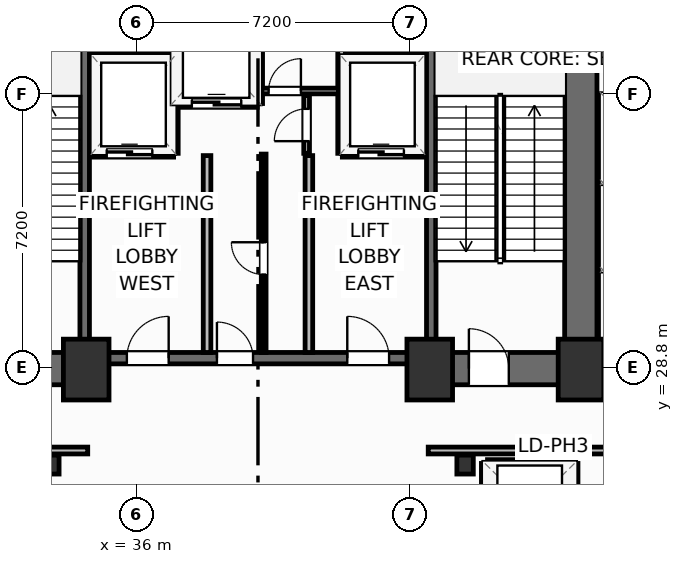
"""IFC4 building model, lengths in metres.
Left out: names, types, materials, properties, quantities, classifications, styles, units other than length and angle.
Written with IfcOpenShell. Run it as: python <this file> out.ifc"""

import sys

from ifc_helpers import new_model, si_unit, direction, frame, frame_2d, origin, origin_2d, place, context, subcontext, project, spatial, rectangle, i_section, extrude, element, fill, save


model = new_model("IFC4")
c1 = context("Model", 3, precision=1e-05, world=origin(), true_north=direction((0.0, 1.0)))
c2 = subcontext(c1, "Body", "Model", "MODEL_VIEW")
j1 = project(units=[si_unit("LENGTHUNIT", "METRE"), si_unit("PLANEANGLEUNIT", "RADIAN")], contexts=[c1])
p1 = place(None, origin())
s1 = spatial("IfcSite", under=j1, at=p1, CompositionType="ELEMENT")
p2 = place(p1, origin())
s2 = spatial("IfcBuilding", under=s1, at=p2, CompositionType="ELEMENT")
p3 = place(p2, origin())
s3 = spatial("IfcBuildingStorey", under=s2, at=p3, CompositionType="ELEMENT", Elevation=0.0)
for number, where, z_axis, x_axis in (
    (1, (34.68, 28.75, 0.0), (0.0, 0.0, 1.0), (1.0, 0.0, 0.0)),
    (2, (43.72, 28.75, 0.0), (0.0, 0.0, 1.0), (1.0, 0.0, 0.0)),
    (3, (47.7, 28.75, 0.0), (0.0, 0.0, 1.0), (1.0, 0.0, 0.0)),
):
    element("IfcColumn", number, at=place(p3, frame(where, z_axis=z_axis, x_axis=x_axis)), inside=s3, PredefinedType="COLUMN", context=c2, shape_type="SweptSolid", body=[
        extrude(rectangle(XDim=1.2, YDim=1.6, at=origin_2d()), origin(), (0.0, 0.0, 1.0), 5.4),
    ])
for number, where, z_axis, x_axis in (
    (4, (33.75, 26.25, 0.0), (0.0, 0.0, 1.0), (1.0, 0.0, 0.0)),
    (5, (44.65, 26.25, 0.0), (0.0, 0.0, 1.0), (1.0, 0.0, 0.0)),
):
    element("IfcColumn", number, at=place(p3, frame(where, z_axis=z_axis, x_axis=x_axis)), inside=s3, PredefinedType="COLUMN", context=c2, shape_type="SweptSolid", body=[
        extrude(i_section(OverallWidth=0.432, OverallDepth=0.498, WebThickness=0.056, FlangeThickness=0.089, FilletRadius=0.025, at=origin_2d()), origin(), (0.0, 0.0, 1.0), 5.4),
    ])
p4 = place(p3, frame((47.695, 29.2, 0.0), z_axis=(0.0, 0.0, 1.0), x_axis=(0.0, 1.0, 0.0)))
e6 = element("IfcWall", 6, at=p4, inside=s3, PredefinedType="SHEAR", context=c2, shape_type="SweptSolid", body=[
    extrude(rectangle(XDim=9.22, YDim=0.85, at=frame_2d((4.61, 0.0))), origin(), (0.0, 0.0, 1.0), 5.12),
])
p5 = place(p3, frame((30.28, 28.775, 0.0), z_axis=(0.0, 0.0, 1.0), x_axis=(1.0, 0.0, 0.0)))
e7 = element("IfcWall", 7, at=p5, inside=s3, PredefinedType="SHEAR", context=c2, shape_type="SweptSolid", body=[
    extrude(rectangle(XDim=4.52, YDim=0.85, at=frame_2d((2.26, 0.0))), origin(), (0.0, 0.0, 1.0), 5.12),
])
p6 = place(p5, frame((1.65, 0.0, 0.0)))
e8 = element("IfcOpeningElement", 8, at=p6, cuts=e7, PredefinedType="OPENING", context=c2, shape_type="SweptSolid", body=[
    extrude(rectangle(XDim=1.05, YDim=2.15, at=frame_2d((0.525, 1.075))), frame((0.0, 0.435, 0.0), z_axis=(0.0, -1.0, 0.0), x_axis=(1.0, 0.0, 0.0)), (0.0, 0.0, 1.0), 0.87),
])
p7 = place(p3, frame((43.6, 28.775, 0.0), z_axis=(0.0, 0.0, 1.0), x_axis=(1.0, 0.0, 0.0)))
e9 = element("IfcWall", 9, at=p7, inside=s3, PredefinedType="SHEAR", context=c2, shape_type="SweptSolid", body=[
    extrude(rectangle(XDim=4.52, YDim=0.85, at=frame_2d((2.26, 0.0))), origin(), (0.0, 0.0, 1.0), 5.12),
])
p8 = place(p7, frame((1.15, 0.0, 0.0)))
e10 = element("IfcOpeningElement", 10, at=p8, cuts=e9, PredefinedType="OPENING", context=c2, shape_type="SweptSolid", body=[
    extrude(rectangle(XDim=1.05, YDim=2.15, at=frame_2d((0.525, 1.075))), frame((0.0, 0.435, 0.0), z_axis=(0.0, -1.0, 0.0), x_axis=(1.0, 0.0, 0.0)), (0.0, 0.0, 1.0), 0.87),
])
p9 = place(p3, frame((34.8, 29.05, 0.0), z_axis=(0.0, 0.0, 1.0), x_axis=(1.0, 0.0, 0.0)))
e11 = element("IfcWall", 11, at=p9, inside=s3, PredefinedType="SHEAR", context=c2, shape_type="SweptSolid", body=[
    extrude(rectangle(XDim=8.8, YDim=0.3, at=frame_2d((4.4, 0.0))), origin(), (0.0, 0.0, 1.0), 5.12),
])
p10 = place(p9, frame((0.95, 0.0, 0.0)))
e12 = element("IfcOpeningElement", 12, at=p10, cuts=e11, PredefinedType="OPENING", context=c2, shape_type="SweptSolid", body=[
    extrude(rectangle(XDim=1.1, YDim=2.15, at=frame_2d((0.55, 1.075))), frame((0.0, 0.16, 0.0), z_axis=(0.0, -1.0, 0.0), x_axis=(1.0, 0.0, 0.0)), (0.0, 0.0, 1.0), 0.32),
])
p11 = place(p9, frame((6.75, 0.0, 0.0)))
e13 = element("IfcOpeningElement", 13, at=p11, cuts=e11, PredefinedType="OPENING", context=c2, shape_type="SweptSolid", body=[
    extrude(rectangle(XDim=1.1, YDim=2.15, at=frame_2d((0.55, 1.075))), frame((0.0, 0.16, 0.0), z_axis=(0.0, -1.0, 0.0), x_axis=(1.0, 0.0, 0.0)), (0.0, 0.0, 1.0), 0.32),
])
p12 = place(p9, frame((3.32, 0.0, 0.0)))
e14 = element("IfcOpeningElement", 14, at=p12, cuts=e11, PredefinedType="OPENING", context=c2, shape_type="SweptSolid", body=[
    extrude(rectangle(XDim=0.95, YDim=2.15, at=frame_2d((0.475, 1.075))), frame((0.0, 0.16, 0.0), z_axis=(0.0, -1.0, 0.0), x_axis=(1.0, 0.0, 0.0)), (0.0, 0.0, 1.0), 0.32),
])
for number, where, z_axis, x_axis in (
    (15, (34.64, 29.2, 0.0), (0.0, 0.0, 1.0), (0.0, 1.0, 0.0)),
    (16, (43.76, 29.2, 0.0), (0.0, 0.0, 1.0), (0.0, 1.0, 0.0)),
):
    element("IfcWall", number, at=place(p3, frame(where, z_axis=z_axis, x_axis=x_axis)), inside=s3, PredefinedType="SHEAR", context=c2, shape_type="SweptSolid", body=[
        extrude(rectangle(XDim=9.22, YDim=0.25, at=frame_2d((4.61, 0.0))), origin(), (0.0, 0.0, 1.0), 5.12),
    ])
p13 = place(p3, frame((21.22, 26.62, 0.0), z_axis=(0.0, 0.0, 1.0), x_axis=(1.0, 0.0, 0.0)))
e17 = element("IfcWall", 17, at=p13, inside=s3, PredefinedType="PARTITIONING", context=c2, shape_type="SweptSolid", body=[
    extrude(rectangle(XDim=13.5, YDim=0.18, at=frame_2d((6.75, 0.0))), origin(), (0.0, 0.0, 1.0), 4.332),
])
p14 = place(p13, frame((5.2, 0.0, 0.0)))
e18 = element("IfcOpeningElement", 18, at=p14, cuts=e17, PredefinedType="OPENING", context=c2, shape_type="SweptSolid", body=[
    extrude(rectangle(XDim=1.1, YDim=2.15, at=frame_2d((0.55, 1.075))), frame((0.0, 0.1, 0.0), z_axis=(0.0, -1.0, 0.0), x_axis=(1.0, 0.0, 0.0)), (0.0, 0.0, 1.0), 0.2),
])
p15 = place(p3, frame((43.68, 26.62, 0.0), z_axis=(0.0, 0.0, 1.0), x_axis=(1.0, 0.0, 0.0)))
e19 = element("IfcWall", 19, at=p15, inside=s3, PredefinedType="PARTITIONING", context=c2, shape_type="SweptSolid", body=[
    extrude(rectangle(XDim=10.98, YDim=0.18, at=frame_2d((5.49, 0.0))), origin(), (0.0, 0.0, 1.0), 5.12),
])
p16 = place(p15, frame((5.03, 0.0, 0.0)))
e20 = element("IfcOpeningElement", 20, at=p16, cuts=e19, PredefinedType="OPENING", context=c2, shape_type="SweptSolid", body=[
    extrude(rectangle(XDim=1.1, YDim=2.15, at=frame_2d((0.55, 1.075))), frame((0.0, 0.1, 0.0), z_axis=(0.0, -1.0, 0.0), x_axis=(1.0, 0.0, 0.0)), (0.0, 0.0, 1.0), 0.2),
])
p17 = place(p3, frame((48.12, 28.8, 0.0), z_axis=(0.0, 0.0, 1.0), x_axis=(1.0, 0.0, 0.0)))
e21 = element("IfcWall", 21, at=p17, inside=s3, PredefinedType="PARTITIONING", context=c2, shape_type="SweptSolid", body=[
    extrude(rectangle(XDim=4.02, YDim=0.18, at=frame_2d((2.01, 0.0))), origin(), (0.0, 0.0, 1.0), 4.332),
])
for number, where, z_axis, x_axis in (
    (22, (37.86, 29.2, 0.0), (0.0, 0.0, 1.0), (0.0, 1.0, 0.0)),
    (23, (40.54, 29.2, 0.0), (0.0, 0.0, 1.0), (0.0, 1.0, 0.0)),
):
    element("IfcWall", number, at=place(p3, frame(where, z_axis=z_axis, x_axis=x_axis)), inside=s3, PredefinedType="PARTITIONING", context=c2, shape_type="SweptSolid", body=[
        extrude(rectangle(XDim=5.18, YDim=0.2, at=frame_2d((2.59, 0.0))), origin(), (0.0, 0.0, 1.0), 5.12),
    ])
p18 = place(p3, frame((34.8, 34.44, 0.0), z_axis=(0.0, 0.0, 1.0), x_axis=(1.0, 0.0, 0.0)))
e24 = element("IfcWall", 24, at=p18, inside=s3, PredefinedType="PARTITIONING", context=c2, shape_type="SweptSolid", body=[
    extrude(rectangle(XDim=2.18, YDim=0.2, at=frame_2d((1.09, 0.0))), origin(), (0.0, 0.0, 1.0), 5.12),
])
p19 = place(p18, frame((0.42, 0.0, 0.0)))
e25 = element("IfcOpeningElement", 25, at=p19, cuts=e24, PredefinedType="OPENING", context=c2, shape_type="SweptSolid", body=[
    extrude(rectangle(XDim=1.2, YDim=2.2, at=frame_2d((0.6, 1.1))), frame((0.0, 0.11, 0.0), z_axis=(0.0, -1.0, 0.0), x_axis=(1.0, 0.0, 0.0)), (0.0, 0.0, 1.0), 0.22),
])
p20 = place(p3, frame((34.8, 36.98, 0.0), z_axis=(0.0, 0.0, 1.0), x_axis=(1.0, 0.0, 0.0)))
e26 = element("IfcWall", 26, at=p20, inside=s3, PredefinedType="PARTITIONING", context=c2, shape_type="SweptSolid", body=[
    extrude(rectangle(XDim=2.18, YDim=0.2, at=frame_2d((1.09, 0.0))), origin(), (0.0, 0.0, 1.0), 5.12),
])
p21 = place(p3, frame((37.0, 34.44, 0.0), z_axis=(0.0, 0.0, 1.0), x_axis=(0.0, 1.0, 0.0)))
e27 = element("IfcWall", 27, at=p21, inside=s3, PredefinedType="PARTITIONING", context=c2, shape_type="SweptSolid", body=[
    extrude(rectangle(XDim=3.9, YDim=0.2, at=frame_2d((1.95, 0.0))), origin(), (0.0, 0.0, 1.0), 5.12),
])
p22 = place(p3, frame((41.42, 34.44, 0.0), z_axis=(0.0, 0.0, 1.0), x_axis=(1.0, 0.0, 0.0)))
e28 = element("IfcWall", 28, at=p22, inside=s3, PredefinedType="PARTITIONING", context=c2, shape_type="SweptSolid", body=[
    extrude(rectangle(XDim=2.18, YDim=0.2, at=frame_2d((1.09, 0.0))), origin(), (0.0, 0.0, 1.0), 5.12),
])
p23 = place(p22, frame((0.42, 0.0, 0.0)))
e29 = element("IfcOpeningElement", 29, at=p23, cuts=e28, PredefinedType="OPENING", context=c2, shape_type="SweptSolid", body=[
    extrude(rectangle(XDim=1.2, YDim=2.2, at=frame_2d((0.6, 1.1))), frame((0.0, 0.11, 0.0), z_axis=(0.0, -1.0, 0.0), x_axis=(1.0, 0.0, 0.0)), (0.0, 0.0, 1.0), 0.22),
])
p24 = place(p3, frame((41.42, 36.98, 0.0), z_axis=(0.0, 0.0, 1.0), x_axis=(1.0, 0.0, 0.0)))
e30 = element("IfcWall", 30, at=p24, inside=s3, PredefinedType="PARTITIONING", context=c2, shape_type="SweptSolid", body=[
    extrude(rectangle(XDim=2.18, YDim=0.2, at=frame_2d((1.09, 0.0))), origin(), (0.0, 0.0, 1.0), 5.12),
])
p25 = place(p3, frame((41.4, 34.44, 0.0), z_axis=(0.0, 0.0, 1.0), x_axis=(0.0, 1.0, 0.0)))
e31 = element("IfcWall", 31, at=p25, inside=s3, PredefinedType="PARTITIONING", context=c2, shape_type="SweptSolid", body=[
    extrude(rectangle(XDim=3.9, YDim=0.2, at=frame_2d((1.95, 0.0))), origin(), (0.0, 0.0, 1.0), 5.12),
])
p26 = place(p3, frame((37.06, 35.75, 0.0), z_axis=(0.0, 0.0, 1.0), x_axis=(1.0, 0.0, 0.0)))
e32 = element("IfcWall", 32, at=p26, inside=s3, PredefinedType="PARTITIONING", context=c2, shape_type="SweptSolid", body=[
    extrude(rectangle(XDim=2.12, YDim=0.2, at=frame_2d((1.06, 0.0))), origin(), (0.0, 0.0, 1.0), 5.12),
])
p27 = place(p26, frame((0.4, 0.0, 0.0)))
e33 = element("IfcOpeningElement", 33, at=p27, cuts=e32, PredefinedType="OPENING", context=c2, shape_type="SweptSolid", body=[
    extrude(rectangle(XDim=1.3, YDim=2.2, at=frame_2d((0.65, 1.1))), frame((0.0, 0.11, 0.0), z_axis=(0.0, -1.0, 0.0), x_axis=(1.0, 0.0, 0.0)), (0.0, 0.0, 1.0), 0.22),
])
p28 = place(p3, frame((39.22, 35.75, 0.0), z_axis=(0.0, 0.0, 1.0), x_axis=(0.0, 1.0, 0.0)))
e34 = element("IfcWall", 34, at=p28, inside=s3, PredefinedType="PARTITIONING", context=c2, shape_type="SweptSolid", body=[
    extrude(rectangle(XDim=2.59, YDim=0.2, at=frame_2d((1.295, 0.0))), origin(), (0.0, 0.0, 1.0), 5.12),
])
p29 = place(p3, frame((39.3, 36.08, 0.0), z_axis=(0.0, 0.0, 1.0), x_axis=(1.0, 0.0, 0.0)))
e35 = element("IfcWall", 35, at=p29, inside=s3, PredefinedType="PARTITIONING", context=c2, shape_type="SweptSolid", body=[
    extrude(rectangle(XDim=2.02, YDim=0.15, at=frame_2d((1.01, 0.0))), origin(), (0.0, 0.0, 1.0), 5.12),
])
p30 = place(p29, frame((0.18, 0.0, 0.0)))
e36 = element("IfcOpeningElement", 36, at=p30, cuts=e35, PredefinedType="OPENING", context=c2, shape_type="SweptSolid", body=[
    extrude(rectangle(XDim=0.85, YDim=2.05, at=frame_2d((0.425, 1.025))), frame((0.0, 0.085, 0.0), z_axis=(0.0, -1.0, 0.0), x_axis=(1.0, 0.0, 0.0)), (0.0, 0.0, 1.0), 0.17),
])
p31 = place(p3, frame((40.48, 34.44, 0.0), z_axis=(0.0, 0.0, 1.0), x_axis=(0.0, 1.0, 0.0)))
e37 = element("IfcWall", 37, at=p31, inside=s3, PredefinedType="PARTITIONING", context=c2, shape_type="SweptSolid", body=[
    extrude(rectangle(XDim=1.52, YDim=0.15, at=frame_2d((0.76, 0.0))), origin(), (0.0, 0.0, 1.0), 5.12),
])
p32 = place(p31, frame((0.32, 0.0, 0.0)))
e38 = element("IfcOpeningElement", 38, at=p32, cuts=e37, PredefinedType="OPENING", context=c2, shape_type="SweptSolid", body=[
    extrude(rectangle(XDim=0.85, YDim=2.05, at=frame_2d((0.425, 1.025))), frame((0.0, 0.085, 0.0), z_axis=(0.0, -1.0, 0.0), x_axis=(1.0, 0.0, 0.0)), (0.0, 0.0, 1.0), 0.17),
])
p33 = place(p3, frame((39.35, 29.2, 0.0), z_axis=(0.0, 0.0, 1.0), x_axis=(0.0, 1.0, 0.0)))
e39 = element("IfcWall", 39, at=p33, inside=s3, PredefinedType="PARTITIONING", context=c2, shape_type="SweptSolid", body=[
    extrude(rectangle(XDim=5.22, YDim=0.125, at=frame_2d((2.61, 0.0))), origin(), (0.0, 0.0, 1.0), 5.12),
])
p34 = place(p33, frame((2.05, 0.0, 0.0)))
e40 = element("IfcOpeningElement", 40, at=p34, cuts=e39, PredefinedType="OPENING", context=c2, shape_type="SweptSolid", body=[
    extrude(rectangle(XDim=0.85, YDim=2.05, at=frame_2d((0.425, 1.025))), frame((0.0, 0.073, 0.0), z_axis=(0.0, -1.0, 0.0), x_axis=(1.0, 0.0, 0.0)), (0.0, 0.0, 1.0), 0.145),
])
p35 = place(p3, frame((48.28, 29.08, 0.0), z_axis=(0.0, 0.0, 1.0), x_axis=(0.0, 1.0, 0.0)))
e41 = element("IfcWall", 41, at=p35, inside=s3, PredefinedType="PARTITIONING", context=c2, shape_type="SweptSolid", body=[
    extrude(rectangle(XDim=6.89, YDim=0.2, at=frame_2d((3.445, 0.0))), origin(), (0.0, 0.0, 1.0), 5.12),
])
p36 = place(p3, frame((45.24, 26.28, 0.0), z_axis=(0.0, 0.0, 1.0), x_axis=(1.0, 0.0, 0.0)))
e42 = element("IfcWall", 42, at=p36, inside=s3, PredefinedType="PARTITIONING", context=c2, shape_type="SweptSolid", body=[
    extrude(rectangle(XDim=2.22, YDim=0.2, at=frame_2d((1.11, 0.0))), origin(), (0.0, 0.0, 1.0), 5.12),
])
p37 = place(p3, frame((45.18, 19.38, 0.0), z_axis=(0.0, 0.0, 1.0), x_axis=(0.0, 1.0, 0.0)))
e43 = element("IfcWall", 43, at=p37, inside=s3, PredefinedType="PARTITIONING", context=c2, shape_type="SweptSolid", body=[
    extrude(rectangle(XDim=6.9, YDim=0.2, at=frame_2d((3.45, 0.0))), origin(), (0.0, 0.0, 1.0), 5.12),
])
p38 = place(p3, frame((47.52, 19.38, 0.0), z_axis=(0.0, 0.0, 1.0), x_axis=(0.0, 1.0, 0.0)))
e44 = element("IfcWall", 44, at=p38, inside=s3, PredefinedType="PARTITIONING", context=c2, shape_type="SweptSolid", body=[
    extrude(rectangle(XDim=6.9, YDim=0.2, at=frame_2d((3.45, 0.0))), origin(), (0.0, 0.0, 1.0), 5.12),
])
p39 = place(p38, frame((0.59, 0.0, 0.0)))
e45 = element("IfcOpeningElement", 45, at=p39, cuts=e44, PredefinedType="OPENING", context=c2, shape_type="SweptSolid", body=[
    extrude(rectangle(XDim=1.1, YDim=2.15, at=frame_2d((0.55, 1.075))), frame((0.0, 0.11, 0.0), z_axis=(0.0, -1.0, 0.0), x_axis=(1.0, 0.0, 0.0)), (0.0, 0.0, 1.0), 0.22),
])
p40 = place(p38, frame((2.89, 0.0, 0.0)))
e46 = element("IfcOpeningElement", 46, at=p40, cuts=e44, PredefinedType="OPENING", context=c2, shape_type="SweptSolid", body=[
    extrude(rectangle(XDim=1.1, YDim=2.15, at=frame_2d((0.55, 1.075))), frame((0.0, 0.11, 0.0), z_axis=(0.0, -1.0, 0.0), x_axis=(1.0, 0.0, 0.0)), (0.0, 0.0, 1.0), 0.22),
])
p41 = place(p38, frame((5.19, 0.0, 0.0)))
e47 = element("IfcOpeningElement", 47, at=p41, cuts=e44, PredefinedType="OPENING", context=c2, shape_type="SweptSolid", body=[
    extrude(rectangle(XDim=1.1, YDim=2.15, at=frame_2d((0.55, 1.075))), frame((0.0, 0.11, 0.0), z_axis=(0.0, -1.0, 0.0), x_axis=(1.0, 0.0, 0.0)), (0.0, 0.0, 1.0), 0.22),
])
p42 = place(p8, origin())
e48 = element("IfcDoor", 48, at=p42, inside=s3, OperationType="SINGLE_SWING_LEFT", PredefinedType="DOOR", context=c2, shape_type="SweptSolid", body=[
    extrude(rectangle(XDim=1.05, YDim=2.15, at=frame_2d((0.525, 1.075))), frame((0.0, 0.025, 0.0), z_axis=(0.0, -1.0, 0.0), x_axis=(1.0, 0.0, 0.0)), (0.0, 0.0, 1.0), 0.05),
])
fill(e10, e48)
p43 = place(p10, origin())
e49 = element("IfcDoor", 49, at=p43, inside=s3, OperationType="SINGLE_SWING_RIGHT", PredefinedType="DOOR", context=c2, shape_type="SweptSolid", body=[
    extrude(rectangle(XDim=1.1, YDim=2.15, at=frame_2d((0.55, 1.075))), frame((0.0, 0.025, 0.0), z_axis=(0.0, -1.0, 0.0), x_axis=(1.0, 0.0, 0.0)), (0.0, 0.0, 1.0), 0.05),
])
fill(e12, e49)
p44 = place(p11, origin())
e50 = element("IfcDoor", 50, at=p44, inside=s3, OperationType="SINGLE_SWING_LEFT", PredefinedType="DOOR", context=c2, shape_type="SweptSolid", body=[
    extrude(rectangle(XDim=1.1, YDim=2.15, at=frame_2d((0.55, 1.075))), frame((0.0, 0.025, 0.0), z_axis=(0.0, -1.0, 0.0), x_axis=(1.0, 0.0, 0.0)), (0.0, 0.0, 1.0), 0.05),
])
fill(e13, e50)
p45 = place(p19, origin())
e51 = element("IfcDoor", 51, at=p45, inside=s3, OperationType="SLIDING_TO_LEFT", PredefinedType="DOOR", context=c2, shape_type="SweptSolid", body=[
    extrude(rectangle(XDim=1.2, YDim=2.2, at=frame_2d((0.6, 1.1))), frame((0.0, 0.025, 0.0), z_axis=(0.0, -1.0, 0.0), x_axis=(1.0, 0.0, 0.0)), (0.0, 0.0, 1.0), 0.05),
])
fill(e25, e51)
p46 = place(p23, origin())
e52 = element("IfcDoor", 52, at=p46, inside=s3, OperationType="SLIDING_TO_LEFT", PredefinedType="DOOR", context=c2, shape_type="SweptSolid", body=[
    extrude(rectangle(XDim=1.2, YDim=2.2, at=frame_2d((0.6, 1.1))), frame((0.0, 0.025, 0.0), z_axis=(0.0, -1.0, 0.0), x_axis=(1.0, 0.0, 0.0)), (0.0, 0.0, 1.0), 0.05),
])
fill(e29, e52)
p47 = place(p27, origin())
e53 = element("IfcDoor", 53, at=p47, inside=s3, OperationType="SLIDING_TO_LEFT", PredefinedType="DOOR", context=c2, shape_type="SweptSolid", body=[
    extrude(rectangle(XDim=1.3, YDim=2.2, at=frame_2d((0.65, 1.1))), frame((0.0, 0.025, 0.0), z_axis=(0.0, -1.0, 0.0), x_axis=(1.0, 0.0, 0.0)), (0.0, 0.0, 1.0), 0.05),
])
fill(e33, e53)
p48 = place(p30, origin())
e54 = element("IfcDoor", 54, at=p48, inside=s3, OperationType="SINGLE_SWING_RIGHT", PredefinedType="DOOR", context=c2, shape_type="SweptSolid", body=[
    extrude(rectangle(XDim=0.85, YDim=2.05, at=frame_2d((0.425, 1.025))), frame((0.0, 0.025, 0.0), z_axis=(0.0, -1.0, 0.0), x_axis=(1.0, 0.0, 0.0)), (0.0, 0.0, 1.0), 0.05),
])
fill(e36, e54)
p49 = place(p32, origin())
e55 = element("IfcDoor", 55, at=p49, inside=s3, OperationType="SINGLE_SWING_LEFT", PredefinedType="DOOR", context=c2, shape_type="SweptSolid", body=[
    extrude(rectangle(XDim=0.85, YDim=2.05, at=frame_2d((0.425, 1.025))), frame((0.0, 0.025, 0.0), z_axis=(0.0, -1.0, 0.0), x_axis=(1.0, 0.0, 0.0)), (0.0, 0.0, 1.0), 0.05),
])
fill(e38, e55)
p50 = place(p34, origin())
e56 = element("IfcDoor", 56, at=p50, inside=s3, OperationType="SINGLE_SWING_RIGHT", PredefinedType="DOOR", context=c2, shape_type="SweptSolid", body=[
    extrude(rectangle(XDim=0.85, YDim=2.05, at=frame_2d((0.425, 1.025))), frame((0.0, 0.025, 0.0), z_axis=(0.0, -1.0, 0.0), x_axis=(1.0, 0.0, 0.0)), (0.0, 0.0, 1.0), 0.05),
])
fill(e40, e56)
p51 = place(p12, origin())
e57 = element("IfcDoor", 57, at=p51, inside=s3, OperationType="SINGLE_SWING_LEFT", PredefinedType="DOOR", context=c2, shape_type="SweptSolid", body=[
    extrude(rectangle(XDim=0.95, YDim=2.15, at=frame_2d((0.475, 1.075))), frame((0.0, 0.025, 0.0), z_axis=(0.0, -1.0, 0.0), x_axis=(1.0, 0.0, 0.0)), (0.0, 0.0, 1.0), 0.05),
])
fill(e14, e57)
save(model, sys.argv[1])
